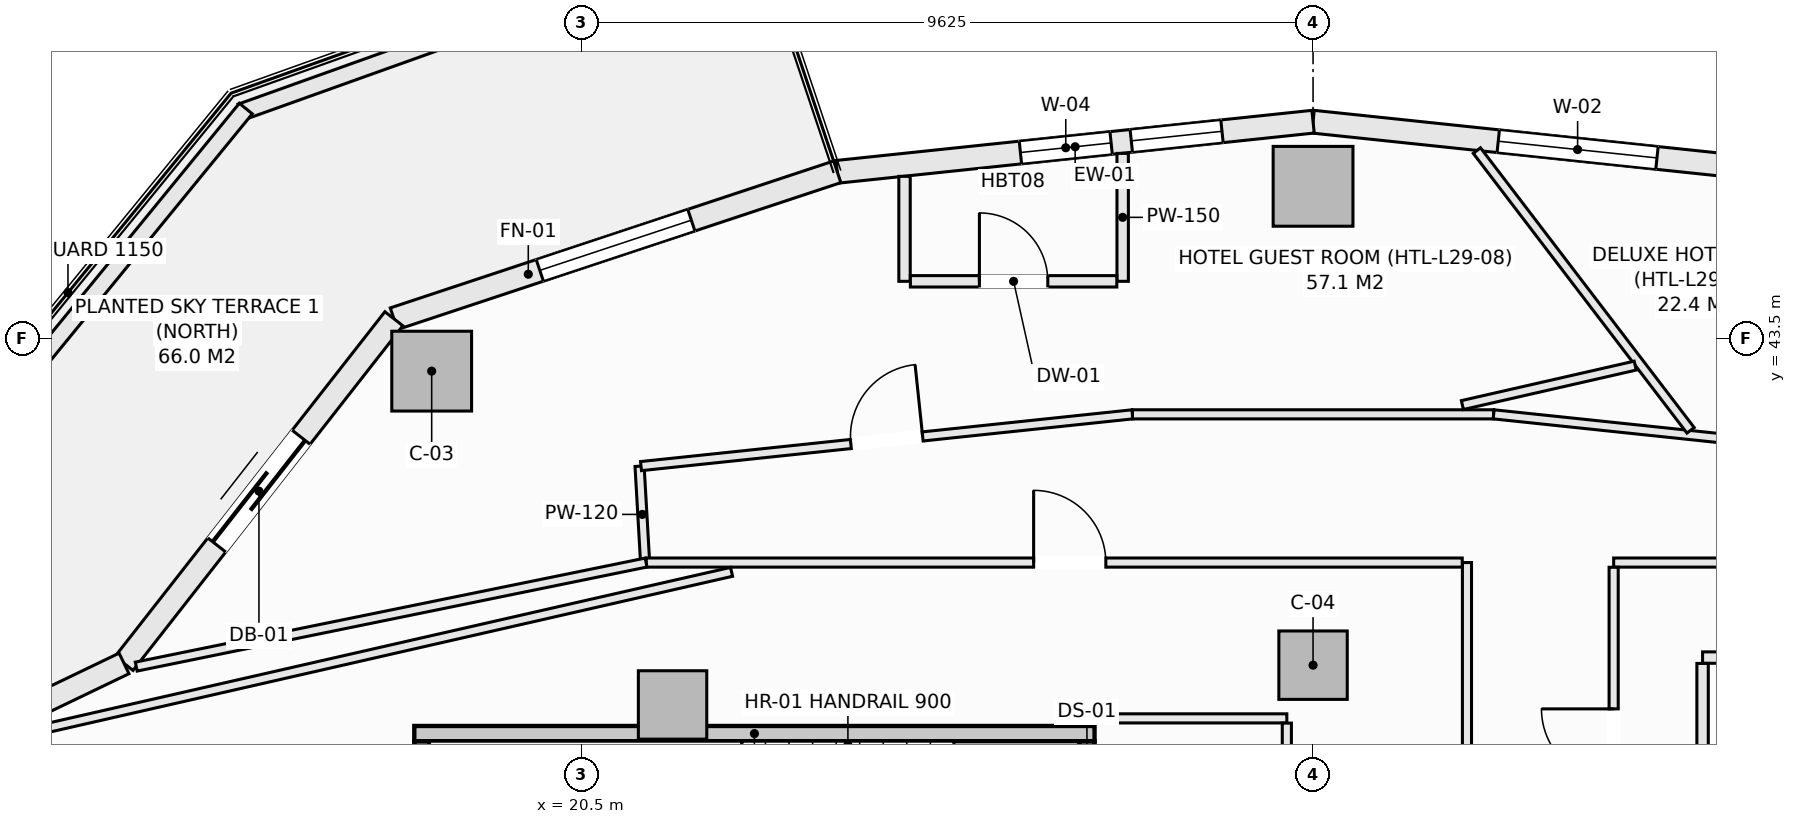
"""IFC4 building model, lengths in metres.
Left out: names, types, materials, properties, quantities, classifications, styles, units other than length and angle.
Written with IfcOpenShell. Run it as: python <this file> out.ifc"""

import sys

from ifc_helpers import new_model, si_unit, direction, frame, frame_2d, origin, origin_2d, place, context, subcontext, project, spatial, rectangle, extrude, element, fill, save


model = new_model("IFC4")
c1 = context("Model", 3, precision=1e-05, world=origin(), true_north=direction((0.0, 1.0)))
c2 = subcontext(c1, "Body", "Model", "MODEL_VIEW")
j1 = project(units=[si_unit("LENGTHUNIT", "METRE"), si_unit("PLANEANGLEUNIT", "RADIAN")], contexts=[c1])
p1 = place(None, origin())
s1 = spatial("IfcSite", under=j1, at=p1, CompositionType="ELEMENT")
p2 = place(p1, origin())
s2 = spatial("IfcBuilding", under=s1, at=p2, CompositionType="ELEMENT")
p3 = place(p2, frame((0.0, 0.0, 118.9)))
s3 = spatial("IfcBuildingStorey", under=s2, at=p3, CompositionType="ELEMENT", Elevation=118.9)
for number, where, z_axis, x_axis in (
    (1, (30.125, 45.5, -0.27), (0.0, 0.0, 1.0), (1.0, 0.0, 0.0)),
    (2, (18.529, 43.068, -0.27), (0.0, 0.0, 1.0), (1.0, 0.0, 0.0)),
):
    element("IfcColumn", number, at=place(p3, frame(where, z_axis=z_axis, x_axis=x_axis)), inside=s3, PredefinedType="COLUMN", context=c2, shape_type="SweptSolid", body=[
        extrude(rectangle(XDim=1.05, YDim=1.05, at=origin_2d()), origin(), (0.0, 0.0, 1.0), 3.4),
    ])
for number, where, z_axis, x_axis in (
    (3, (30.125, 39.2, -0.27), (0.0, 0.0, 1.0), (1.0, 0.0, 0.0)),
    (4, (21.698, 38.677, -0.27), (0.0, 0.0, 1.0), (1.0, 0.0, 0.0)),
):
    element("IfcColumn", number, at=place(p3, frame(where, z_axis=z_axis, x_axis=x_axis)), inside=s3, PredefinedType="COLUMN", context=c2, shape_type="SweptSolid", body=[
        extrude(rectangle(XDim=0.9, YDim=0.9, at=origin_2d()), origin(), (0.0, 0.0, 1.0), 3.4),
    ])
p4 = place(p3, frame((30.125, 46.35, 0.0), z_axis=(0.0, 0.0, 1.0), x_axis=(0.994498012394, -0.104755445421, 0.0)))
e5 = element("IfcWall", 5, at=p4, inside=s3, PredefinedType="SOLIDWALL", context=c2, shape_type="SweptSolid", body=[
    extrude(rectangle(XDim=6.295, YDim=0.3, at=frame_2d((3.147, 0.0))), origin(), (0.0, 0.0, 1.0), 2.653),
])
p5 = place(p4, frame((2.45, 0.0, 0.74)))
e6 = element("IfcOpeningElement", 6, at=p5, cuts=e5, PredefinedType="OPENING", context=c2, shape_type="SweptSolid", body=[
    extrude(rectangle(XDim=2.1, YDim=1.7, at=frame_2d((1.05, 0.85))), frame((0.0, 0.16, 0.0), z_axis=(0.0, -1.0, 0.0), x_axis=(1.0, 0.0, 0.0)), (0.0, 0.0, 1.0), 0.32),
])
p6 = place(p3, frame((23.865, 45.691, 0.0), z_axis=(0.0, 0.0, 1.0), x_axis=(0.994498012394, 0.104755445421, 0.0)))
e7 = element("IfcWall", 7, at=p6, inside=s3, PredefinedType="SOLIDWALL", context=c2, shape_type="SweptSolid", body=[
    extrude(rectangle(XDim=6.295, YDim=0.3, at=frame_2d((3.147, 0.0))), origin(), (0.0, 0.0, 1.0), 2.653),
])
p7 = place(p6, frame((2.423, 0.0, 0.74)))
e8 = element("IfcOpeningElement", 8, at=p7, cuts=e7, PredefinedType="OPENING", context=c2, shape_type="SweptSolid", body=[
    extrude(rectangle(XDim=1.2, YDim=1.7, at=frame_2d((0.6, 0.85))), frame((0.0, 0.16, 0.0), z_axis=(0.0, -1.0, 0.0), x_axis=(1.0, 0.0, 0.0)), (0.0, 0.0, 1.0), 0.32),
])
p8 = place(p6, frame((3.89, 0.0, 0.74)))
e9 = element("IfcOpeningElement", 9, at=p8, cuts=e7, PredefinedType="OPENING", context=c2, shape_type="SweptSolid", body=[
    extrude(rectangle(XDim=1.2, YDim=1.7, at=frame_2d((0.6, 0.85))), frame((0.0, 0.16, 0.0), z_axis=(0.0, -1.0, 0.0), x_axis=(1.0, 0.0, 0.0)), (0.0, 0.0, 1.0), 0.32),
])
p9 = place(p3, frame((18.031, 43.758, 0.0), z_axis=(0.0, 0.0, 1.0), x_axis=(0.949238009374, 0.314558741032, 0.0)))
e10 = element("IfcWall", 10, at=p9, inside=s3, PredefinedType="SOLIDWALL", context=c2, shape_type="SweptSolid", body=[
    extrude(rectangle(XDim=6.146, YDim=0.3, at=frame_2d((3.073, 0.0))), origin(), (0.0, 0.0, 1.0), 2.653),
])
p10 = place(p9, frame((2.023, 0.0, 0.74)))
e11 = element("IfcOpeningElement", 11, at=p10, cuts=e10, PredefinedType="OPENING", context=c2, shape_type="SweptSolid", body=[
    extrude(rectangle(XDim=2.1, YDim=1.7, at=frame_2d((1.05, 0.85))), frame((0.0, 0.16, 0.0), z_axis=(0.0, -1.0, 0.0), x_axis=(1.0, 0.0, 0.0)), (0.0, 0.0, 1.0), 0.32),
])
p11 = place(p3, frame((14.481, 39.223, 0.0), z_axis=(0.0, 0.0, 1.0), x_axis=(0.616435134162, 0.787405693001, 0.0)))
e12 = element("IfcWall", 12, at=p11, inside=s3, PredefinedType="SOLIDWALL", context=c2, shape_type="SweptSolid", body=[
    extrude(rectangle(XDim=5.759, YDim=0.3, at=frame_2d((2.879, 0.0))), origin(), (0.0, 0.0, 1.0), 2.653),
])
p12 = place(p11, frame((1.979, 0.0, 0.0)))
e13 = element("IfcOpeningElement", 13, at=p12, cuts=e12, PredefinedType="OPENING", context=c2, shape_type="SweptSolid", body=[
    extrude(rectangle(XDim=1.8, YDim=2.25, at=frame_2d((0.9, 1.125))), frame((0.0, 0.16, 0.0), z_axis=(0.0, -1.0, 0.0), x_axis=(1.0, 0.0, 0.0)), (0.0, 0.0, 1.0), 0.32),
])
p13 = place(p3, frame((9.178, 36.675, 0.0), z_axis=(0.0, 0.0, 1.0), x_axis=(0.901370184739, 0.433049408339, 0.0)))
e14 = element("IfcWall", 14, at=p13, inside=s3, PredefinedType="SOLIDWALL", context=c2, shape_type="SweptSolid", body=[
    extrude(rectangle(XDim=5.884, YDim=0.3, at=frame_2d((2.942, 0.0))), origin(), (0.0, 0.0, 1.0), 2.653),
])
p14 = place(p13, frame((1.892, 0.0, 0.74)))
e15 = element("IfcOpeningElement", 15, at=p14, cuts=e14, PredefinedType="OPENING", context=c2, shape_type="SweptSolid", body=[
    extrude(rectangle(XDim=2.1, YDim=1.7, at=frame_2d((1.05, 0.85))), frame((0.0, 0.16, 0.0), z_axis=(0.0, -1.0, 0.0), x_axis=(1.0, 0.0, 0.0)), (0.0, 0.0, 1.0), 0.32),
])
p15 = place(p3, frame((16.018, 46.477, 0.0), z_axis=(0.0, 0.0, 1.0), x_axis=(0.941628873241, 0.336652736627, 0.0)))
e16 = element("IfcWall", 16, at=p15, inside=s3, PredefinedType="PARAPET", context=c2, shape_type="SweptSolid", body=[
    extrude(rectangle(XDim=7.235, YDim=0.22, at=frame_2d((3.618, 0.0))), origin(), (0.0, 0.0, 1.0), 0.52),
])
p16 = place(p3, frame((11.791, 41.274, 0.0), z_axis=(0.0, 0.0, 1.0), x_axis=(0.633024046468, 0.774132131224, 0.0)))
e17 = element("IfcWall", 17, at=p16, inside=s3, PredefinedType="PARAPET", context=c2, shape_type="SweptSolid", body=[
    extrude(rectangle(XDim=6.781, YDim=0.22, at=frame_2d((3.39, 0.0))), origin(), (0.0, 0.0, 1.0), 0.52),
])
p17 = place(p3, frame((27.15, 35.16, -0.27), z_axis=(0.0, 0.0, 1.0), x_axis=(0.0, 1.0, 0.0)))
e18 = element("IfcWall", 18, at=p17, inside=s3, PredefinedType="SHEAR", context=c2, shape_type="SweptSolid", body=[
    extrude(rectangle(XDim=3.04, YDim=0.2, at=frame_2d((1.52, 0.0))), origin(), (0.0, 0.0, 1.0), 3.4),
])
p18 = place(p17, frame((0.97, 0.0, 0.27)))
e19 = element("IfcOpeningElement", 19, at=p18, cuts=e18, PredefinedType="OPENING", context=c2, shape_type="SweptSolid", body=[
    extrude(rectangle(XDim=1.1, YDim=2.15, at=frame_2d((0.55, 1.075))), frame((0.0, 0.11, 0.0), z_axis=(0.0, -1.0, 0.0), x_axis=(1.0, 0.0, 0.0)), (0.0, 0.0, 1.0), 0.22),
])
p19 = place(p3, frame((18.4, 35.16, -0.27), z_axis=(0.0, 0.0, 1.0), x_axis=(0.0, 1.0, 0.0)))
e20 = element("IfcWall", 20, at=p19, inside=s3, PredefinedType="SHEAR", context=c2, shape_type="SweptSolid", body=[
    extrude(rectangle(XDim=3.04, YDim=0.2, at=frame_2d((1.52, 0.0))), origin(), (0.0, 0.0, 1.0), 3.4),
])
p20 = place(p3, frame((18.3, 38.3, -0.27), z_axis=(0.0, 0.0, 1.0), x_axis=(1.0, 0.0, 0.0)))
e21 = element("IfcWall", 21, at=p20, inside=s3, PredefinedType="SHEAR", context=c2, shape_type="SweptSolid", body=[
    extrude(rectangle(XDim=8.95, YDim=0.2, at=frame_2d((4.475, 0.0))), origin(), (0.0, 0.0, 1.0), 3.4),
])
p21 = place(p3, frame((27.62, 44.25, 0.0), z_axis=(0.0, 0.0, 1.0), x_axis=(0.0, 1.0, 0.0)))
e22 = element("IfcWall", 22, at=p21, inside=s3, PredefinedType="PARTITIONING", context=c2, shape_type="SweptSolid", body=[
    extrude(rectangle(XDim=1.683, YDim=0.15, at=frame_2d((0.842, 0.0))), origin(), (0.0, 0.0, 1.0), 3.13),
])
p22 = place(p3, frame((21.264, 41.818, 0.0), z_axis=(0.0, 0.0, 1.0), x_axis=(0.0574492264, -0.99834842935, 0.0)))
e23 = element("IfcWall", 23, at=p22, inside=s3, PredefinedType="PARTITIONING", context=c2, shape_type="SweptSolid", body=[
    extrude(rectangle(XDim=1.271, YDim=0.12, at=frame_2d((0.635, 0.0))), origin(), (0.0, 0.0, 1.0), 3.13),
])
p23 = place(p3, frame((27.25, 38.5, 0.0), z_axis=(0.0, 0.0, 1.0), x_axis=(1.0, 0.0, 0.0)))
e24 = element("IfcWall", 24, at=p23, inside=s3, PredefinedType="PARTITIONING", context=c2, shape_type="SweptSolid", body=[
    extrude(rectangle(XDim=2.53, YDim=0.12, at=frame_2d((1.265, 0.0))), origin(), (0.0, 0.0, 1.0), 3.13),
])
p24 = place(p3, frame((29.78, 35.75, 0.0), z_axis=(0.0, 0.0, 1.0), x_axis=(0.0, 1.0, 0.0)))
e25 = element("IfcWall", 25, at=p24, inside=s3, PredefinedType="PARTITIONING", context=c2, shape_type="SweptSolid", body=[
    extrude(rectangle(XDim=2.688, YDim=0.12, at=frame_2d((1.344, 0.0))), origin(), (0.0, 0.0, 1.0), 3.13),
])
p25 = place(p3, frame((32.15, 35.812, 0.0), z_axis=(0.0, 0.0, 1.0), x_axis=(0.0, 1.0, 0.0)))
e26 = element("IfcWall", 26, at=p25, inside=s3, PredefinedType="PARTITIONING", context=c2, shape_type="SweptSolid", body=[
    extrude(rectangle(XDim=4.738, YDim=0.12, at=frame_2d((2.369, 0.0))), origin(), (0.0, 0.0, 1.0), 3.13),
])
p26 = place(p3, frame((21.351, 40.55, 0.0), z_axis=(0.0, 0.0, 1.0), x_axis=(1.0, 0.0, 0.0)))
e27 = element("IfcWall", 27, at=p26, inside=s3, PredefinedType="PARTITIONING", context=c2, shape_type="SweptSolid", body=[
    extrude(rectangle(XDim=10.737, YDim=0.12, at=frame_2d((5.369, 0.0))), origin(), (0.0, 0.0, 1.0), 3.13),
])
p27 = place(p26, frame((5.098, 0.0, 0.0)))
e28 = element("IfcOpeningElement", 28, at=p27, cuts=e27, PredefinedType="OPENING", context=c2, shape_type="SweptSolid", body=[
    extrude(rectangle(XDim=0.95, YDim=2.1, at=frame_2d((0.475, 1.05))), frame((0.0, 0.07, 0.0), z_axis=(0.0, -1.0, 0.0), x_axis=(1.0, 0.0, 0.0)), (0.0, 0.0, 1.0), 0.14),
])
p28 = place(p3, frame((34.08, 40.55, 0.0), z_axis=(0.0, 0.0, 1.0), x_axis=(1.0, 0.0, 0.0)))
e29 = element("IfcWall", 29, at=p28, inside=s3, PredefinedType="PARTITIONING", context=c2, shape_type="SweptSolid", body=[
    extrude(rectangle(XDim=4.82, YDim=0.12, at=frame_2d((2.41, 0.0))), origin(), (0.0, 0.0, 1.0), 3.13),
])
p29 = place(p28, frame((3.29, 0.0, 0.0)))
e30 = element("IfcOpeningElement", 30, at=p29, cuts=e29, PredefinedType="OPENING", context=c2, shape_type="SweptSolid", body=[
    extrude(rectangle(XDim=0.95, YDim=2.1, at=frame_2d((0.475, 1.05))), frame((0.0, 0.07, 0.0), z_axis=(0.0, -1.0, 0.0), x_axis=(1.0, 0.0, 0.0)), (0.0, 0.0, 1.0), 0.14),
])
p30 = place(p3, frame((21.283, 41.819, 0.0), z_axis=(0.0, 0.0, 1.0), x_axis=(0.994501131299, 0.104725831799, 0.0)))
e31 = element("IfcWall", 31, at=p30, inside=s3, PredefinedType="PARTITIONING", context=c2, shape_type="SweptSolid", body=[
    extrude(rectangle(XDim=6.502, YDim=0.12, at=frame_2d((3.251, 0.0))), origin(), (0.0, 0.0, 1.0), 3.13),
])
p31 = place(p30, frame((2.776, 0.0, 0.0)))
e32 = element("IfcOpeningElement", 32, at=p31, cuts=e31, PredefinedType="OPENING", context=c2, shape_type="SweptSolid", body=[
    extrude(rectangle(XDim=0.95, YDim=2.1, at=frame_2d((0.475, 1.05))), frame((0.0, 0.07, 0.0), z_axis=(0.0, -1.0, 0.0), x_axis=(1.0, 0.0, 0.0)), (0.0, 0.0, 1.0), 0.14),
])
p32 = place(p3, frame((27.749, 42.5, 0.0), z_axis=(0.0, 0.0, 1.0), x_axis=(1.0, 0.0, 0.0)))
e33 = element("IfcWall", 33, at=p32, inside=s3, PredefinedType="PARTITIONING", context=c2, shape_type="SweptSolid", body=[
    extrude(rectangle(XDim=4.752, YDim=0.12, at=frame_2d((2.376, 0.0))), origin(), (0.0, 0.0, 1.0), 3.13),
])
p33 = place(p3, frame((32.501, 42.5, 0.0), z_axis=(0.0, 0.0, 1.0), x_axis=(0.994501131299, -0.104725831799, 0.0)))
e34 = element("IfcWall", 34, at=p33, inside=s3, PredefinedType="PARTITIONING", context=c2, shape_type="SweptSolid", body=[
    extrude(rectangle(XDim=6.502, YDim=0.12, at=frame_2d((3.251, 0.0))), origin(), (0.0, 0.0, 1.0), 3.13),
])
p34 = place(p33, frame((3.855, 0.0, 0.0)))
e35 = element("IfcOpeningElement", 35, at=p34, cuts=e34, PredefinedType="OPENING", context=c2, shape_type="SweptSolid", body=[
    extrude(rectangle(XDim=0.95, YDim=2.1, at=frame_2d((0.475, 1.05))), frame((0.0, 0.07, 0.0), z_axis=(0.0, -1.0, 0.0), x_axis=(1.0, 0.0, 0.0)), (0.0, 0.0, 1.0), 0.14),
])
p35 = place(p3, frame((34.08, 35.812, 0.0), z_axis=(0.0, 0.0, 1.0), x_axis=(0.0, 1.0, 0.0)))
e36 = element("IfcWall", 36, at=p35, inside=s3, PredefinedType="PARTITIONING", context=c2, shape_type="SweptSolid", body=[
    extrude(rectangle(XDim=4.676, YDim=0.12, at=frame_2d((2.338, 0.0))), origin(), (0.0, 0.0, 1.0), 2.812),
])
p36 = place(p35, frame((1.863, 0.0, 0.0)))
e37 = element("IfcOpeningElement", 37, at=p36, cuts=e36, PredefinedType="OPENING", context=c2, shape_type="SweptSolid", body=[
    extrude(rectangle(XDim=0.95, YDim=2.1, at=frame_2d((0.475, 1.05))), frame((0.0, 0.07, 0.0), z_axis=(0.0, -1.0, 0.0), x_axis=(1.0, 0.0, 0.0)), (0.0, 0.0, 1.0), 0.14),
])
p37 = place(p3, frame((32.28, 45.97, 0.0), z_axis=(0.0, 0.0, 1.0), x_axis=(0.607060694389, -0.794655468318, 0.0)))
e38 = element("IfcWall", 38, at=p37, inside=s3, PredefinedType="PARTITIONING", context=c2, shape_type="SweptSolid", body=[
    extrude(rectangle(XDim=4.632, YDim=0.12, at=frame_2d((2.316, 0.0))), origin(), (0.0, 0.0, 1.0), 3.13),
])
p38 = place(p3, frame((35.25, 39.3, 0.0), z_axis=(0.0, 0.0, 1.0), x_axis=(1.0, 0.0, 0.0)))
e39 = element("IfcWall", 39, at=p38, inside=s3, PredefinedType="PARTITIONING", context=c2, shape_type="SweptSolid", body=[
    extrude(rectangle(XDim=2.029, YDim=0.15, at=frame_2d((1.014, 0.0))), origin(), (0.0, 0.0, 1.0), 3.13),
])
p39 = place(p3, frame((35.25, 36.75, 0.0), z_axis=(0.0, 0.0, 1.0), x_axis=(0.0, 1.0, 0.0)))
e40 = element("IfcWall", 40, at=p39, inside=s3, PredefinedType="PARTITIONING", context=c2, shape_type="SweptSolid", body=[
    extrude(rectangle(XDim=2.473, YDim=0.15, at=frame_2d((1.236, 0.0))), origin(), (0.0, 0.0, 1.0), 3.13),
])
p40 = place(p3, frame((24.75, 44.25, 0.0), z_axis=(0.0, 0.0, 1.0), x_axis=(0.0, 1.0, 0.0)))
e41 = element("IfcWall", 41, at=p40, inside=s3, PredefinedType="PARTITIONING", context=c2, shape_type="SweptSolid", body=[
    extrude(rectangle(XDim=1.381, YDim=0.15, at=frame_2d((0.69, 0.0))), origin(), (0.0, 0.0, 1.0), 3.13),
])
p41 = place(p3, frame((24.827, 44.25, 0.0), z_axis=(0.0, 0.0, 1.0), x_axis=(1.0, 0.0, 0.0)))
e42 = element("IfcWall", 42, at=p41, inside=s3, PredefinedType="PARTITIONING", context=c2, shape_type="SweptSolid", body=[
    extrude(rectangle(XDim=2.716, YDim=0.15, at=frame_2d((1.358, 0.0))), origin(), (0.0, 0.0, 1.0), 2.653),
])
p42 = place(p41, frame((0.908, 0.0, 0.0)))
e43 = element("IfcOpeningElement", 43, at=p42, cuts=e42, PredefinedType="OPENING", context=c2, shape_type="SweptSolid", body=[
    extrude(rectangle(XDim=0.9, YDim=2.1, at=frame_2d((0.45, 1.05))), frame((0.0, 0.085, 0.0), z_axis=(0.0, -1.0, 0.0), x_axis=(1.0, 0.0, 0.0)), (0.0, 0.0, 1.0), 0.17),
])
p43 = place(p3, frame((12.961, 38.257, 0.0), z_axis=(0.0, 0.0, 1.0), x_axis=(0.974943994821, 0.222450459567, 0.0)))
e44 = element("IfcWall", 44, at=p43, inside=s3, PredefinedType="PARTITIONING", context=c2, shape_type="SweptSolid", body=[
    extrude(rectangle(XDim=9.758, YDim=0.12, at=frame_2d((4.879, 0.0))), origin(), (0.0, 0.0, 1.0), 3.13),
])
p44 = place(p3, frame((32.09, 42.622, 0.0), z_axis=(0.0, 0.0, 1.0), x_axis=(0.974947431387, 0.222435397434, 0.0)))
e45 = element("IfcWall", 45, at=p44, inside=s3, PredefinedType="PARTITIONING", context=c2, shape_type="SweptSolid", body=[
    extrude(rectangle(XDim=2.332, YDim=0.12, at=frame_2d((1.166, 0.0))), origin(), (0.0, 0.0, 1.0), 3.13),
])
p45 = place(p3, frame((14.642, 39.181, 0.0), z_axis=(0.0, 0.0, 1.0), x_axis=(0.979813468357, 0.199913899534, 0.0)))
e46 = element("IfcWall", 46, at=p45, inside=s3, PredefinedType="PARTITIONING", context=c2, shape_type="SweptSolid", body=[
    extrude(rectangle(XDim=6.846, YDim=0.12, at=frame_2d((3.423, 0.0))), origin(), (0.0, 0.0, 1.0), 3.13),
])
p46 = place(p5, origin())
e47 = element("IfcWindow", 47, at=p46, inside=s3, PartitioningType="SINGLE_PANEL", PredefinedType="WINDOW", context=c2, shape_type="SweptSolid", body=[
    extrude(rectangle(XDim=2.1, YDim=1.7, at=frame_2d((1.05, 0.85))), frame((0.0, 0.03, 0.0), z_axis=(0.0, -1.0, 0.0), x_axis=(1.0, 0.0, 0.0)), (0.0, 0.0, 1.0), 0.06),
])
fill(e6, e47)
p47 = place(p7, origin())
e48 = element("IfcWindow", 48, at=p47, inside=s3, PartitioningType="SINGLE_PANEL", PredefinedType="WINDOW", context=c2, shape_type="SweptSolid", body=[
    extrude(rectangle(XDim=1.2, YDim=1.7, at=frame_2d((0.6, 0.85))), frame((0.0, 0.03, 0.0), z_axis=(0.0, -1.0, 0.0), x_axis=(1.0, 0.0, 0.0)), (0.0, 0.0, 1.0), 0.06),
])
fill(e8, e48)
p48 = place(p10, origin())
e49 = element("IfcWindow", 49, at=p48, inside=s3, PartitioningType="SINGLE_PANEL", PredefinedType="WINDOW", context=c2, shape_type="SweptSolid", body=[
    extrude(rectangle(XDim=2.1, YDim=1.7, at=frame_2d((1.05, 0.85))), frame((0.0, 0.03, 0.0), z_axis=(0.0, -1.0, 0.0), x_axis=(1.0, 0.0, 0.0)), (0.0, 0.0, 1.0), 0.06),
])
fill(e11, e49)
p49 = place(p12, origin())
e50 = element("IfcDoor", 50, at=p49, inside=s3, OperationType="SLIDING_TO_LEFT", PredefinedType="DOOR", context=c2, shape_type="SweptSolid", body=[
    extrude(rectangle(XDim=1.8, YDim=2.25, at=frame_2d((0.9, 1.125))), frame((0.0, 0.025, 0.0), z_axis=(0.0, -1.0, 0.0), x_axis=(1.0, 0.0, 0.0)), (0.0, 0.0, 1.0), 0.05),
])
fill(e13, e50)
p50 = place(p36, origin())
e51 = element("IfcDoor", 51, at=p50, inside=s3, OperationType="SINGLE_SWING_RIGHT", PredefinedType="DOOR", context=c2, shape_type="SweptSolid", body=[
    extrude(rectangle(XDim=0.95, YDim=2.1, at=frame_2d((0.475, 1.05))), frame((0.0, 0.025, 0.0), z_axis=(0.0, -1.0, 0.0), x_axis=(1.0, 0.0, 0.0)), (0.0, 0.0, 1.0), 0.05),
])
fill(e37, e51)
p51 = place(p31, origin())
e52 = element("IfcDoor", 52, at=p51, inside=s3, OperationType="SINGLE_SWING_RIGHT", PredefinedType="DOOR", context=c2, shape_type="SweptSolid", body=[
    extrude(rectangle(XDim=0.95, YDim=2.1, at=frame_2d((0.475, 1.05))), frame((0.0, 0.025, 0.0), z_axis=(0.0, -1.0, 0.0), x_axis=(1.0, 0.0, 0.0)), (0.0, 0.0, 1.0), 0.05),
])
fill(e32, e52)
p52 = place(p27, origin())
e53 = element("IfcDoor", 53, at=p52, inside=s3, OperationType="SINGLE_SWING_LEFT", PredefinedType="DOOR", context=c2, shape_type="SweptSolid", body=[
    extrude(rectangle(XDim=0.95, YDim=2.1, at=frame_2d((0.475, 1.05))), frame((0.0, 0.025, 0.0), z_axis=(0.0, -1.0, 0.0), x_axis=(1.0, 0.0, 0.0)), (0.0, 0.0, 1.0), 0.05),
])
fill(e28, e53)
p53 = place(p42, origin())
e54 = element("IfcDoor", 54, at=p53, inside=s3, OperationType="SINGLE_SWING_LEFT", PredefinedType="DOOR", context=c2, shape_type="SweptSolid", body=[
    extrude(rectangle(XDim=0.9, YDim=2.1, at=frame_2d((0.45, 1.05))), frame((0.0, 0.025, 0.0), z_axis=(0.0, -1.0, 0.0), x_axis=(1.0, 0.0, 0.0)), (0.0, 0.0, 1.0), 0.05),
])
fill(e43, e54)
p54 = place(p8, origin())
e55 = element("IfcWindow", 55, at=p54, inside=s3, PartitioningType="SINGLE_PANEL", PredefinedType="WINDOW", context=c2, shape_type="SweptSolid", body=[
    extrude(rectangle(XDim=1.2, YDim=1.7, at=frame_2d((0.6, 0.85))), frame((0.0, 0.03, 0.0), z_axis=(0.0, -1.0, 0.0), x_axis=(1.0, 0.0, 0.0)), (0.0, 0.0, 1.0), 0.06),
])
fill(e9, e55)
save(model, sys.argv[1])
